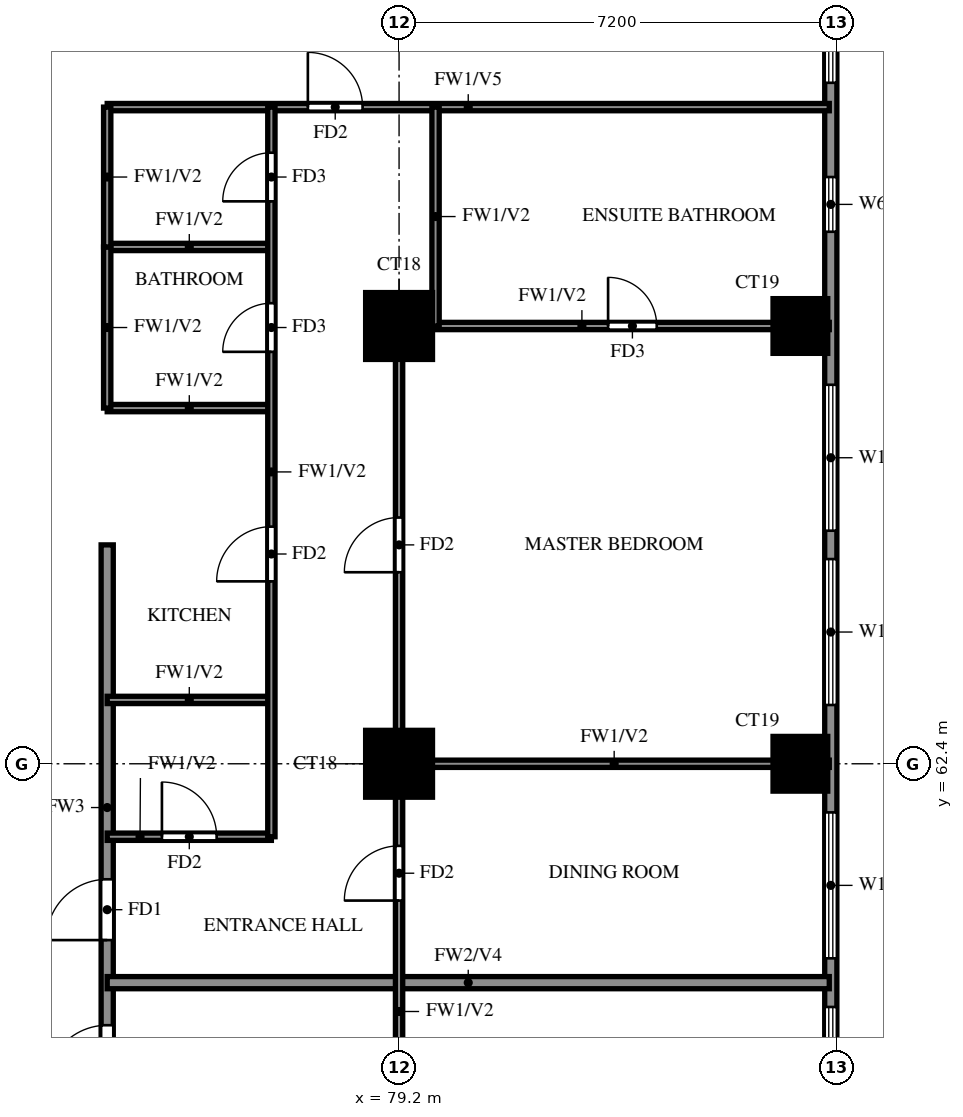
"""IFC4 building model, lengths in metres.
Left out: names, types, materials, properties, quantities, classifications, styles, units other than length and angle.
Written with IfcOpenShell. Run it as: python <this file> out.ifc"""

import sys

from ifc_helpers import new_model, si_unit, direction, frame, frame_2d, origin, origin_2d, place, context, subcontext, project, spatial, rectangle, extrude, source, transform, mapped, element, fill, save


model = new_model("IFC4")
c1 = context("Model", 3, precision=1e-05, world=origin(), true_north=direction((0.0, 1.0)))
c2 = subcontext(c1, "Body", "Model", "MODEL_VIEW")
j1 = project(units=[si_unit("LENGTHUNIT", "METRE"), si_unit("PLANEANGLEUNIT", "RADIAN")], contexts=[c1])
p1 = place(None, origin())
s1 = spatial("IfcSite", under=j1, at=p1, CompositionType="ELEMENT")
p2 = place(p1, origin())
s2 = spatial("IfcBuilding", under=s1, at=p2, CompositionType="ELEMENT")
p3 = place(p2, frame((0.0, 0.0, 113.0)))
s3 = spatial("IfcBuildingStorey", under=s2, at=p3, CompositionType="ELEMENT", Elevation=113.0)
m1 = source(origin(), c2, "Body", "SweptSolid", [
    extrude(rectangle(XDim=1.1, YDim=1.1, at=origin_2d()), origin(), (0.0, 0.0, 1.0), 3.2),
])
p4 = place(p3, frame((79.2, 62.4, 0.0), z_axis=(0.0, 0.0, 1.0), x_axis=(1.0, 0.0, 0.0)))
e1 = element("IfcColumn", 1, at=p4, inside=s3, PredefinedType="COLUMN", context=c2, shape_type="MappedRepresentation", body=[
    mapped(m1, transform((0.0, 0.0, 0.0))),
])
m2 = source(origin(), c2, "Body", "SweptSolid", [
    extrude(rectangle(XDim=0.9, YDim=0.9, at=origin_2d()), origin(), (0.0, 0.0, 1.0), 3.2),
])
p5 = place(p3, frame((85.8, 62.4, 0.0), z_axis=(0.0, 0.0, 1.0), x_axis=(1.0, 0.0, 0.0)))
e2 = element("IfcColumn", 2, at=p5, inside=s3, PredefinedType="COLUMN", context=c2, shape_type="MappedRepresentation", body=[
    mapped(m2, transform((0.0, 0.0, 0.0))),
])
p6 = place(p3, frame((79.2, 69.6, 0.0), z_axis=(0.0, 0.0, 1.0), x_axis=(1.0, 0.0, 0.0)))
e3 = element("IfcColumn", 3, at=p6, inside=s3, PredefinedType="COLUMN", context=c2, shape_type="MappedRepresentation", body=[
    mapped(m1, transform((0.0, 0.0, 0.0))),
])
p7 = place(p3, frame((85.8, 69.6, 0.0), z_axis=(0.0, 0.0, 1.0), x_axis=(1.0, 0.0, 0.0)))
e4 = element("IfcColumn", 4, at=p7, inside=s3, PredefinedType="COLUMN", context=c2, shape_type="MappedRepresentation", body=[
    mapped(m2, transform((0.0, 0.0, 0.0))),
])
p8 = place(p3, frame((86.3, 48.2, 0.0), z_axis=(0.0, 0.0, 1.0), x_axis=(0.0, 1.0, 0.0)))
e5 = element("IfcWall", 5, at=p8, inside=s3, PredefinedType="SOLIDWALL", context=c2, shape_type="SweptSolid", body=[
    extrude(rectangle(XDim=28.6, YDim=0.2, at=frame_2d((14.3, 0.0))), origin(), (0.0, 0.0, 1.0), 3.2),
])
p9 = place(p8, frame((0.6, 0.0, 0.6)))
e6 = element("IfcOpeningElement", 6, at=p9, cuts=e5, PredefinedType="OPENING", context=c2, shape_type="SweptSolid", body=[
    extrude(rectangle(XDim=2.4, YDim=2.4, at=frame_2d((1.2, 1.2))), frame((0.0, 0.11, 0.0), z_axis=(0.0, -1.0, 0.0), x_axis=(1.0, 0.0, 0.0)), (0.0, 0.0, 1.0), 0.22),
])
p10 = place(p8, frame((3.8, 0.0, 0.6)))
e7 = element("IfcOpeningElement", 7, at=p10, cuts=e5, PredefinedType="OPENING", context=c2, shape_type="SweptSolid", body=[
    extrude(rectangle(XDim=2.4, YDim=2.4, at=frame_2d((1.2, 1.2))), frame((0.0, 0.11, 0.0), z_axis=(0.0, -1.0, 0.0), x_axis=(1.0, 0.0, 0.0)), (0.0, 0.0, 1.0), 0.22),
])
p11 = place(p8, frame((7.8, 0.0, 0.6)))
e8 = element("IfcOpeningElement", 8, at=p11, cuts=e5, PredefinedType="OPENING", context=c2, shape_type="SweptSolid", body=[
    extrude(rectangle(XDim=2.4, YDim=2.4, at=frame_2d((1.2, 1.2))), frame((0.0, 0.11, 0.0), z_axis=(0.0, -1.0, 0.0), x_axis=(1.0, 0.0, 0.0)), (0.0, 0.0, 1.0), 0.22),
])
p12 = place(p8, frame((11.0, 0.0, 0.6)))
e9 = element("IfcOpeningElement", 9, at=p12, cuts=e5, PredefinedType="OPENING", context=c2, shape_type="SweptSolid", body=[
    extrude(rectangle(XDim=2.4, YDim=2.4, at=frame_2d((1.2, 1.2))), frame((0.0, 0.11, 0.0), z_axis=(0.0, -1.0, 0.0), x_axis=(1.0, 0.0, 0.0)), (0.0, 0.0, 1.0), 0.22),
])
p13 = place(p8, frame((15.167, 0.0, 0.6)))
e10 = element("IfcOpeningElement", 10, at=p13, cuts=e5, PredefinedType="OPENING", context=c2, shape_type="SweptSolid", body=[
    extrude(rectangle(XDim=2.4, YDim=2.4, at=frame_2d((1.2, 1.2))), frame((0.0, 0.11, 0.0), z_axis=(0.0, -1.0, 0.0), x_axis=(1.0, 0.0, 0.0)), (0.0, 0.0, 1.0), 0.22),
])
p14 = place(p8, frame((18.033, 0.0, 0.6)))
e11 = element("IfcOpeningElement", 11, at=p14, cuts=e5, PredefinedType="OPENING", context=c2, shape_type="SweptSolid", body=[
    extrude(rectangle(XDim=2.4, YDim=2.4, at=frame_2d((1.2, 1.2))), frame((0.0, 0.11, 0.0), z_axis=(0.0, -1.0, 0.0), x_axis=(1.0, 0.0, 0.0)), (0.0, 0.0, 1.0), 0.22),
])
p15 = place(p8, frame((22.95, 0.0, 1.5)))
e12 = element("IfcOpeningElement", 12, at=p15, cuts=e5, PredefinedType="OPENING", context=c2, shape_type="SweptSolid", body=[
    extrude(rectangle(XDim=0.9, YDim=0.9, at=frame_2d((0.45, 0.45))), frame((0.0, 0.11, 0.0), z_axis=(0.0, -1.0, 0.0), x_axis=(1.0, 0.0, 0.0)), (0.0, 0.0, 1.0), 0.22),
])
p16 = place(p8, frame((25.4, 0.0, 0.6)))
e13 = element("IfcOpeningElement", 13, at=p16, cuts=e5, PredefinedType="OPENING", context=c2, shape_type="SweptSolid", body=[
    extrude(rectangle(XDim=2.4, YDim=2.4, at=frame_2d((1.2, 1.2))), frame((0.0, 0.11, 0.0), z_axis=(0.0, -1.0, 0.0), x_axis=(1.0, 0.0, 0.0)), (0.0, 0.0, 1.0), 0.22),
])
p17 = place(p3, frame((74.4, 56.4, 0.0), z_axis=(0.0, 0.0, 1.0), x_axis=(0.0, 1.0, 0.0)))
e14 = element("IfcWall", 14, at=p17, inside=s3, PredefinedType="SOLIDWALL", context=c2, shape_type="SweptSolid", body=[
    extrude(rectangle(XDim=9.6, YDim=0.2, at=frame_2d((4.8, 0.0))), origin(), (0.0, 0.0, 1.0), 3.2),
])
p18 = place(p17, frame((0.7, 0.0, 0.0)))
e15 = element("IfcOpeningElement", 15, at=p18, cuts=e14, PredefinedType="OPENING", context=c2, shape_type="SweptSolid", body=[
    extrude(rectangle(XDim=1.0, YDim=2.1, at=frame_2d((0.5, 1.05))), frame((0.0, 0.11, 0.0), z_axis=(0.0, -1.0, 0.0), x_axis=(1.0, 0.0, 0.0)), (0.0, 0.0, 1.0), 0.22),
])
p19 = place(p17, frame((3.1, 0.0, 0.0)))
e16 = element("IfcOpeningElement", 16, at=p19, cuts=e14, PredefinedType="OPENING", context=c2, shape_type="SweptSolid", body=[
    extrude(rectangle(XDim=1.0, YDim=2.1, at=frame_2d((0.5, 1.05))), frame((0.0, 0.11, 0.0), z_axis=(0.0, -1.0, 0.0), x_axis=(1.0, 0.0, 0.0)), (0.0, 0.0, 1.0), 0.22),
])
p20 = place(p3, frame((74.4, 58.8, 0.0), z_axis=(0.0, 0.0, 1.0), x_axis=(1.0, 0.0, 0.0)))
e17 = element("IfcWall", 17, at=p20, inside=s3, PredefinedType="SOLIDWALL", context=c2, shape_type="SweptSolid", body=[
    extrude(rectangle(XDim=11.875, YDim=0.2, at=frame_2d((5.938, 0.0))), origin(), (0.0, 0.0, 1.0), 2.3),
])
p21 = place(p3, frame((74.4, 61.2, 0.0), z_axis=(0.0, 0.0, 1.0), x_axis=(1.0, 0.0, 0.0)))
e18 = element("IfcWall", 18, at=p21, inside=s3, PredefinedType="PARTITIONING", context=c2, shape_type="SweptSolid", body=[
    extrude(rectangle(XDim=2.7, YDim=0.12, at=frame_2d((1.35, 0.0))), origin(), (0.0, 0.0, 1.0), 3.2),
])
p22 = place(p21, frame((0.9, 0.0, 0.0)))
e19 = element("IfcOpeningElement", 19, at=p22, cuts=e18, PredefinedType="OPENING", context=c2, shape_type="SweptSolid", body=[
    extrude(rectangle(XDim=0.9, YDim=2.1, at=frame_2d((0.45, 1.05))), frame((0.0, 0.07, 0.0), z_axis=(0.0, -1.0, 0.0), x_axis=(1.0, 0.0, 0.0)), (0.0, 0.0, 1.0), 0.14),
])
p23 = place(p3, frame((79.2, 62.4, 0.0), z_axis=(0.0, 0.0, 1.0), x_axis=(1.0, 0.0, 0.0)))
e20 = element("IfcWall", 20, at=p23, inside=s3, PredefinedType="PARTITIONING", context=c2, shape_type="SweptSolid", body=[
    extrude(rectangle(XDim=7.075, YDim=0.12, at=frame_2d((3.538, 0.0))), origin(), (0.0, 0.0, 1.0), 3.2),
])
for number, where, z_axis, x_axis in (
    (21, (74.4, 63.45, 0.0), (0.0, 0.0, 1.0), (1.0, 0.0, 0.0)),
    (22, (74.4, 68.25, 0.0), (0.0, 0.0, 1.0), (1.0, 0.0, 0.0)),
):
    element("IfcWall", number, at=place(p3, frame(where, z_axis=z_axis, x_axis=x_axis)), inside=s3, PredefinedType="PARTITIONING", context=c2, shape_type="SweptSolid", body=[
        extrude(rectangle(XDim=2.7, YDim=0.12, at=frame_2d((1.35, 0.0))), origin(), (0.0, 0.0, 1.0), 3.2),
    ])
p24 = place(p3, frame((79.2, 69.6, 0.0), z_axis=(0.0, 0.0, 1.0), x_axis=(1.0, 0.0, 0.0)))
e23 = element("IfcWall", 23, at=p24, inside=s3, PredefinedType="PARTITIONING", context=c2, shape_type="SweptSolid", body=[
    extrude(rectangle(XDim=7.075, YDim=0.12, at=frame_2d((3.538, 0.0))), origin(), (0.0, 0.0, 1.0), 3.2),
])
p25 = place(p24, frame((3.438, 0.0, 0.0)))
e24 = element("IfcOpeningElement", 24, at=p25, cuts=e23, PredefinedType="OPENING", context=c2, shape_type="SweptSolid", body=[
    extrude(rectangle(XDim=0.8, YDim=2.1, at=frame_2d((0.4, 1.05))), frame((0.0, 0.07, 0.0), z_axis=(0.0, -1.0, 0.0), x_axis=(1.0, 0.0, 0.0)), (0.0, 0.0, 1.0), 0.14),
])
p26 = place(p3, frame((74.4, 70.9, 0.0), z_axis=(0.0, 0.0, 1.0), x_axis=(1.0, 0.0, 0.0)))
e25 = element("IfcWall", 25, at=p26, inside=s3, PredefinedType="PARTITIONING", context=c2, shape_type="SweptSolid", body=[
    extrude(rectangle(XDim=2.7, YDim=0.12, at=frame_2d((1.35, 0.0))), origin(), (0.0, 0.0, 1.0), 3.2),
])
p27 = place(p3, frame((74.4, 73.2, 0.0), z_axis=(0.0, 0.0, 1.0), x_axis=(1.0, 0.0, 0.0)))
e26 = element("IfcWall", 26, at=p27, inside=s3, PredefinedType="PARTITIONING", context=c2, shape_type="SweptSolid", body=[
    extrude(rectangle(XDim=11.875, YDim=0.12, at=frame_2d((5.938, 0.0))), origin(), (0.0, 0.0, 1.0), 2.3),
])
p28 = place(p27, frame((3.3, 0.0, 0.0)))
e27 = element("IfcOpeningElement", 27, at=p28, cuts=e26, PredefinedType="OPENING", context=c2, shape_type="SweptSolid", body=[
    extrude(rectangle(XDim=0.9, YDim=2.1, at=frame_2d((0.45, 1.05))), frame((0.0, 0.07, 0.0), z_axis=(0.0, -1.0, 0.0), x_axis=(1.0, 0.0, 0.0)), (0.0, 0.0, 1.0), 0.14),
])
p29 = place(p3, frame((74.4, 68.25, 0.0), z_axis=(0.0, 0.0, 1.0), x_axis=(0.0, 1.0, 0.0)))
e28 = element("IfcWall", 28, at=p29, inside=s3, PredefinedType="PARTITIONING", context=c2, shape_type="SweptSolid", body=[
    extrude(rectangle(XDim=2.65, YDim=0.12, at=frame_2d((1.325, 0.0))), origin(), (0.0, 0.0, 1.0), 3.2),
])
p30 = place(p3, frame((74.4, 70.9, 0.0), z_axis=(0.0, 0.0, 1.0), x_axis=(0.0, 1.0, 0.0)))
e29 = element("IfcWall", 29, at=p30, inside=s3, PredefinedType="PARTITIONING", context=c2, shape_type="SweptSolid", body=[
    extrude(rectangle(XDim=2.3, YDim=0.12, at=frame_2d((1.15, 0.0))), origin(), (0.0, 0.0, 1.0), 3.2),
])
p31 = place(p3, frame((77.1, 61.2, 0.0), z_axis=(0.0, 0.0, 1.0), x_axis=(0.0, 1.0, 0.0)))
e30 = element("IfcWall", 30, at=p31, inside=s3, PredefinedType="PARTITIONING", context=c2, shape_type="SweptSolid", body=[
    extrude(rectangle(XDim=12.0, YDim=0.12, at=frame_2d((6.0, 0.0))), origin(), (0.0, 0.0, 1.0), 3.2),
])
p32 = place(p31, frame((4.2, 0.0, 0.0)))
e31 = element("IfcOpeningElement", 31, at=p32, cuts=e30, PredefinedType="OPENING", context=c2, shape_type="SweptSolid", body=[
    extrude(rectangle(XDim=0.9, YDim=2.1, at=frame_2d((0.45, 1.05))), frame((0.0, 0.07, 0.0), z_axis=(0.0, -1.0, 0.0), x_axis=(1.0, 0.0, 0.0)), (0.0, 0.0, 1.0), 0.14),
])
p33 = place(p31, frame((7.975, 0.0, 0.0)))
e32 = element("IfcOpeningElement", 32, at=p33, cuts=e30, PredefinedType="OPENING", context=c2, shape_type="SweptSolid", body=[
    extrude(rectangle(XDim=0.8, YDim=2.1, at=frame_2d((0.4, 1.05))), frame((0.0, 0.07, 0.0), z_axis=(0.0, -1.0, 0.0), x_axis=(1.0, 0.0, 0.0)), (0.0, 0.0, 1.0), 0.14),
])
p34 = place(p31, frame((10.45, 0.0, 0.0)))
e33 = element("IfcOpeningElement", 33, at=p34, cuts=e30, PredefinedType="OPENING", context=c2, shape_type="SweptSolid", body=[
    extrude(rectangle(XDim=0.8, YDim=2.1, at=frame_2d((0.4, 1.05))), frame((0.0, 0.07, 0.0), z_axis=(0.0, -1.0, 0.0), x_axis=(1.0, 0.0, 0.0)), (0.0, 0.0, 1.0), 0.14),
])
p35 = place(p3, frame((79.2, 48.125, 0.0), z_axis=(0.0, 0.0, 1.0), x_axis=(0.0, 1.0, 0.0)))
e34 = element("IfcWall", 34, at=p35, inside=s3, PredefinedType="PARTITIONING", context=c2, shape_type="SweptSolid", body=[
    extrude(rectangle(XDim=21.475, YDim=0.12, at=frame_2d((10.738, 0.0))), origin(), (0.0, 0.0, 1.0), 3.2),
])
p36 = place(p35, frame((1.288, 0.0, 0.0)))
e35 = element("IfcOpeningElement", 35, at=p36, cuts=e34, PredefinedType="OPENING", context=c2, shape_type="SweptSolid", body=[
    extrude(rectangle(XDim=0.9, YDim=2.1, at=frame_2d((0.45, 1.05))), frame((0.0, 0.07, 0.0), z_axis=(0.0, -1.0, 0.0), x_axis=(1.0, 0.0, 0.0)), (0.0, 0.0, 1.0), 0.14),
])
p37 = place(p35, frame((7.825, 0.0, 0.0)))
e36 = element("IfcOpeningElement", 36, at=p37, cuts=e34, PredefinedType="OPENING", context=c2, shape_type="SweptSolid", body=[
    extrude(rectangle(XDim=1.5, YDim=2.1, at=frame_2d((0.75, 1.05))), frame((0.0, 0.07, 0.0), z_axis=(0.0, -1.0, 0.0), x_axis=(1.0, 0.0, 0.0)), (0.0, 0.0, 1.0), 0.14),
])
p38 = place(p35, frame((12.025, 0.0, 0.0)))
e37 = element("IfcOpeningElement", 37, at=p38, cuts=e34, PredefinedType="OPENING", context=c2, shape_type="SweptSolid", body=[
    extrude(rectangle(XDim=0.9, YDim=2.1, at=frame_2d((0.45, 1.05))), frame((0.0, 0.07, 0.0), z_axis=(0.0, -1.0, 0.0), x_axis=(1.0, 0.0, 0.0)), (0.0, 0.0, 1.0), 0.14),
])
p39 = place(p35, frame((17.425, 0.0, 0.0)))
e38 = element("IfcOpeningElement", 38, at=p39, cuts=e34, PredefinedType="OPENING", context=c2, shape_type="SweptSolid", body=[
    extrude(rectangle(XDim=0.9, YDim=2.1, at=frame_2d((0.45, 1.05))), frame((0.0, 0.07, 0.0), z_axis=(0.0, -1.0, 0.0), x_axis=(1.0, 0.0, 0.0)), (0.0, 0.0, 1.0), 0.14),
])
p40 = place(p3, frame((79.8, 69.6, 0.0), z_axis=(0.0, 0.0, 1.0), x_axis=(0.0, 1.0, 0.0)))
e39 = element("IfcWall", 39, at=p40, inside=s3, PredefinedType="PARTITIONING", context=c2, shape_type="SweptSolid", body=[
    extrude(rectangle(XDim=3.6, YDim=0.12, at=frame_2d((1.8, 0.0))), origin(), (0.0, 0.0, 1.0), 3.2),
])
p41 = place(p11, origin())
e40 = element("IfcWindow", 40, at=p41, inside=s3, PartitioningType="DOUBLE_PANEL_VERTICAL", PredefinedType="WINDOW", context=c2, shape_type="SweptSolid", body=[
    extrude(rectangle(XDim=2.4, YDim=2.4, at=frame_2d((1.2, 1.2))), frame((0.0, 0.03, 0.0), z_axis=(0.0, -1.0, 0.0), x_axis=(1.0, 0.0, 0.0)), (0.0, 0.0, 1.0), 0.06),
])
fill(e8, e40)
p42 = place(p12, origin())
e41 = element("IfcWindow", 41, at=p42, inside=s3, PartitioningType="DOUBLE_PANEL_VERTICAL", PredefinedType="WINDOW", context=c2, shape_type="SweptSolid", body=[
    extrude(rectangle(XDim=2.4, YDim=2.4, at=frame_2d((1.2, 1.2))), frame((0.0, 0.03, 0.0), z_axis=(0.0, -1.0, 0.0), x_axis=(1.0, 0.0, 0.0)), (0.0, 0.0, 1.0), 0.06),
])
fill(e9, e41)
p43 = place(p13, origin())
e42 = element("IfcWindow", 42, at=p43, inside=s3, PartitioningType="DOUBLE_PANEL_VERTICAL", PredefinedType="WINDOW", context=c2, shape_type="SweptSolid", body=[
    extrude(rectangle(XDim=2.4, YDim=2.4, at=frame_2d((1.2, 1.2))), frame((0.0, 0.03, 0.0), z_axis=(0.0, -1.0, 0.0), x_axis=(1.0, 0.0, 0.0)), (0.0, 0.0, 1.0), 0.06),
])
fill(e10, e42)
p44 = place(p14, origin())
e43 = element("IfcWindow", 43, at=p44, inside=s3, PartitioningType="DOUBLE_PANEL_VERTICAL", PredefinedType="WINDOW", context=c2, shape_type="SweptSolid", body=[
    extrude(rectangle(XDim=2.4, YDim=2.4, at=frame_2d((1.2, 1.2))), frame((0.0, 0.03, 0.0), z_axis=(0.0, -1.0, 0.0), x_axis=(1.0, 0.0, 0.0)), (0.0, 0.0, 1.0), 0.06),
])
fill(e11, e43)
p45 = place(p15, origin())
e44 = element("IfcWindow", 44, at=p45, inside=s3, PartitioningType="SINGLE_PANEL", PredefinedType="WINDOW", context=c2, shape_type="SweptSolid", body=[
    extrude(rectangle(XDim=0.9, YDim=0.9, at=frame_2d((0.45, 0.45))), frame((0.0, 0.03, 0.0), z_axis=(0.0, -1.0, 0.0), x_axis=(1.0, 0.0, 0.0)), (0.0, 0.0, 1.0), 0.06),
])
fill(e12, e44)
p46 = place(p16, origin())
e45 = element("IfcWindow", 45, at=p46, inside=s3, PartitioningType="DOUBLE_PANEL_VERTICAL", PredefinedType="WINDOW", context=c2, shape_type="SweptSolid", body=[
    extrude(rectangle(XDim=2.4, YDim=2.4, at=frame_2d((1.2, 1.2))), frame((0.0, 0.03, 0.0), z_axis=(0.0, -1.0, 0.0), x_axis=(1.0, 0.0, 0.0)), (0.0, 0.0, 1.0), 0.06),
])
fill(e13, e45)
p47 = place(p18, origin())
e46 = element("IfcDoor", 46, at=p47, inside=s3, OperationType="SINGLE_SWING_LEFT", PredefinedType="DOOR", context=c2, shape_type="SweptSolid", body=[
    extrude(rectangle(XDim=1.0, YDim=2.1, at=frame_2d((0.5, 1.05))), frame((0.0, 0.025, 0.0), z_axis=(0.0, -1.0, 0.0), x_axis=(1.0, 0.0, 0.0)), (0.0, 0.0, 1.0), 0.05),
])
fill(e15, e46)
p48 = place(p19, origin())
e47 = element("IfcDoor", 47, at=p48, inside=s3, OperationType="SINGLE_SWING_RIGHT", PredefinedType="DOOR", context=c2, shape_type="SweptSolid", body=[
    extrude(rectangle(XDim=1.0, YDim=2.1, at=frame_2d((0.5, 1.05))), frame((0.0, 0.025, 0.0), z_axis=(0.0, -1.0, 0.0), x_axis=(1.0, 0.0, 0.0)), (0.0, 0.0, 1.0), 0.05),
])
fill(e16, e47)
p49 = place(p38, origin())
e48 = element("IfcDoor", 48, at=p49, inside=s3, OperationType="SINGLE_SWING_LEFT", PredefinedType="DOOR", context=c2, shape_type="SweptSolid", body=[
    extrude(rectangle(XDim=0.9, YDim=2.1, at=frame_2d((0.45, 1.05))), frame((0.0, 0.025, 0.0), z_axis=(0.0, -1.0, 0.0), x_axis=(1.0, 0.0, 0.0)), (0.0, 0.0, 1.0), 0.05),
])
fill(e37, e48)
p50 = place(p39, origin())
e49 = element("IfcDoor", 49, at=p50, inside=s3, OperationType="SINGLE_SWING_LEFT", PredefinedType="DOOR", context=c2, shape_type="SweptSolid", body=[
    extrude(rectangle(XDim=0.9, YDim=2.1, at=frame_2d((0.45, 1.05))), frame((0.0, 0.025, 0.0), z_axis=(0.0, -1.0, 0.0), x_axis=(1.0, 0.0, 0.0)), (0.0, 0.0, 1.0), 0.05),
])
fill(e38, e49)
p51 = place(p25, origin())
e50 = element("IfcDoor", 50, at=p51, inside=s3, OperationType="SINGLE_SWING_RIGHT", PredefinedType="DOOR", context=c2, shape_type="SweptSolid", body=[
    extrude(rectangle(XDim=0.8, YDim=2.1, at=frame_2d((0.4, 1.05))), frame((0.0, 0.025, 0.0), z_axis=(0.0, -1.0, 0.0), x_axis=(1.0, 0.0, 0.0)), (0.0, 0.0, 1.0), 0.05),
])
fill(e24, e50)
p52 = place(p28, origin())
e51 = element("IfcDoor", 51, at=p52, inside=s3, OperationType="SINGLE_SWING_LEFT", PredefinedType="DOOR", context=c2, shape_type="SweptSolid", body=[
    extrude(rectangle(XDim=0.9, YDim=2.1, at=frame_2d((0.45, 1.05))), frame((0.0, 0.025, 0.0), z_axis=(0.0, -1.0, 0.0), x_axis=(1.0, 0.0, 0.0)), (0.0, 0.0, 1.0), 0.05),
])
fill(e27, e51)
p53 = place(p22, origin())
e52 = element("IfcDoor", 52, at=p53, inside=s3, OperationType="SINGLE_SWING_LEFT", PredefinedType="DOOR", context=c2, shape_type="SweptSolid", body=[
    extrude(rectangle(XDim=0.9, YDim=2.1, at=frame_2d((0.45, 1.05))), frame((0.0, 0.025, 0.0), z_axis=(0.0, -1.0, 0.0), x_axis=(1.0, 0.0, 0.0)), (0.0, 0.0, 1.0), 0.05),
])
fill(e19, e52)
p54 = place(p32, origin())
e53 = element("IfcDoor", 53, at=p54, inside=s3, OperationType="SINGLE_SWING_RIGHT", PredefinedType="DOOR", context=c2, shape_type="SweptSolid", body=[
    extrude(rectangle(XDim=0.9, YDim=2.1, at=frame_2d((0.45, 1.05))), frame((0.0, 0.025, 0.0), z_axis=(0.0, -1.0, 0.0), x_axis=(1.0, 0.0, 0.0)), (0.0, 0.0, 1.0), 0.05),
])
fill(e31, e53)
p55 = place(p33, origin())
e54 = element("IfcDoor", 54, at=p55, inside=s3, OperationType="SINGLE_SWING_LEFT", PredefinedType="DOOR", context=c2, shape_type="SweptSolid", body=[
    extrude(rectangle(XDim=0.8, YDim=2.1, at=frame_2d((0.4, 1.05))), frame((0.0, 0.025, 0.0), z_axis=(0.0, -1.0, 0.0), x_axis=(1.0, 0.0, 0.0)), (0.0, 0.0, 1.0), 0.05),
])
fill(e32, e54)
p56 = place(p34, origin())
e55 = element("IfcDoor", 55, at=p56, inside=s3, OperationType="SINGLE_SWING_LEFT", PredefinedType="DOOR", context=c2, shape_type="SweptSolid", body=[
    extrude(rectangle(XDim=0.8, YDim=2.1, at=frame_2d((0.4, 1.05))), frame((0.0, 0.025, 0.0), z_axis=(0.0, -1.0, 0.0), x_axis=(1.0, 0.0, 0.0)), (0.0, 0.0, 1.0), 0.05),
])
fill(e33, e55)
save(model, sys.argv[1])
